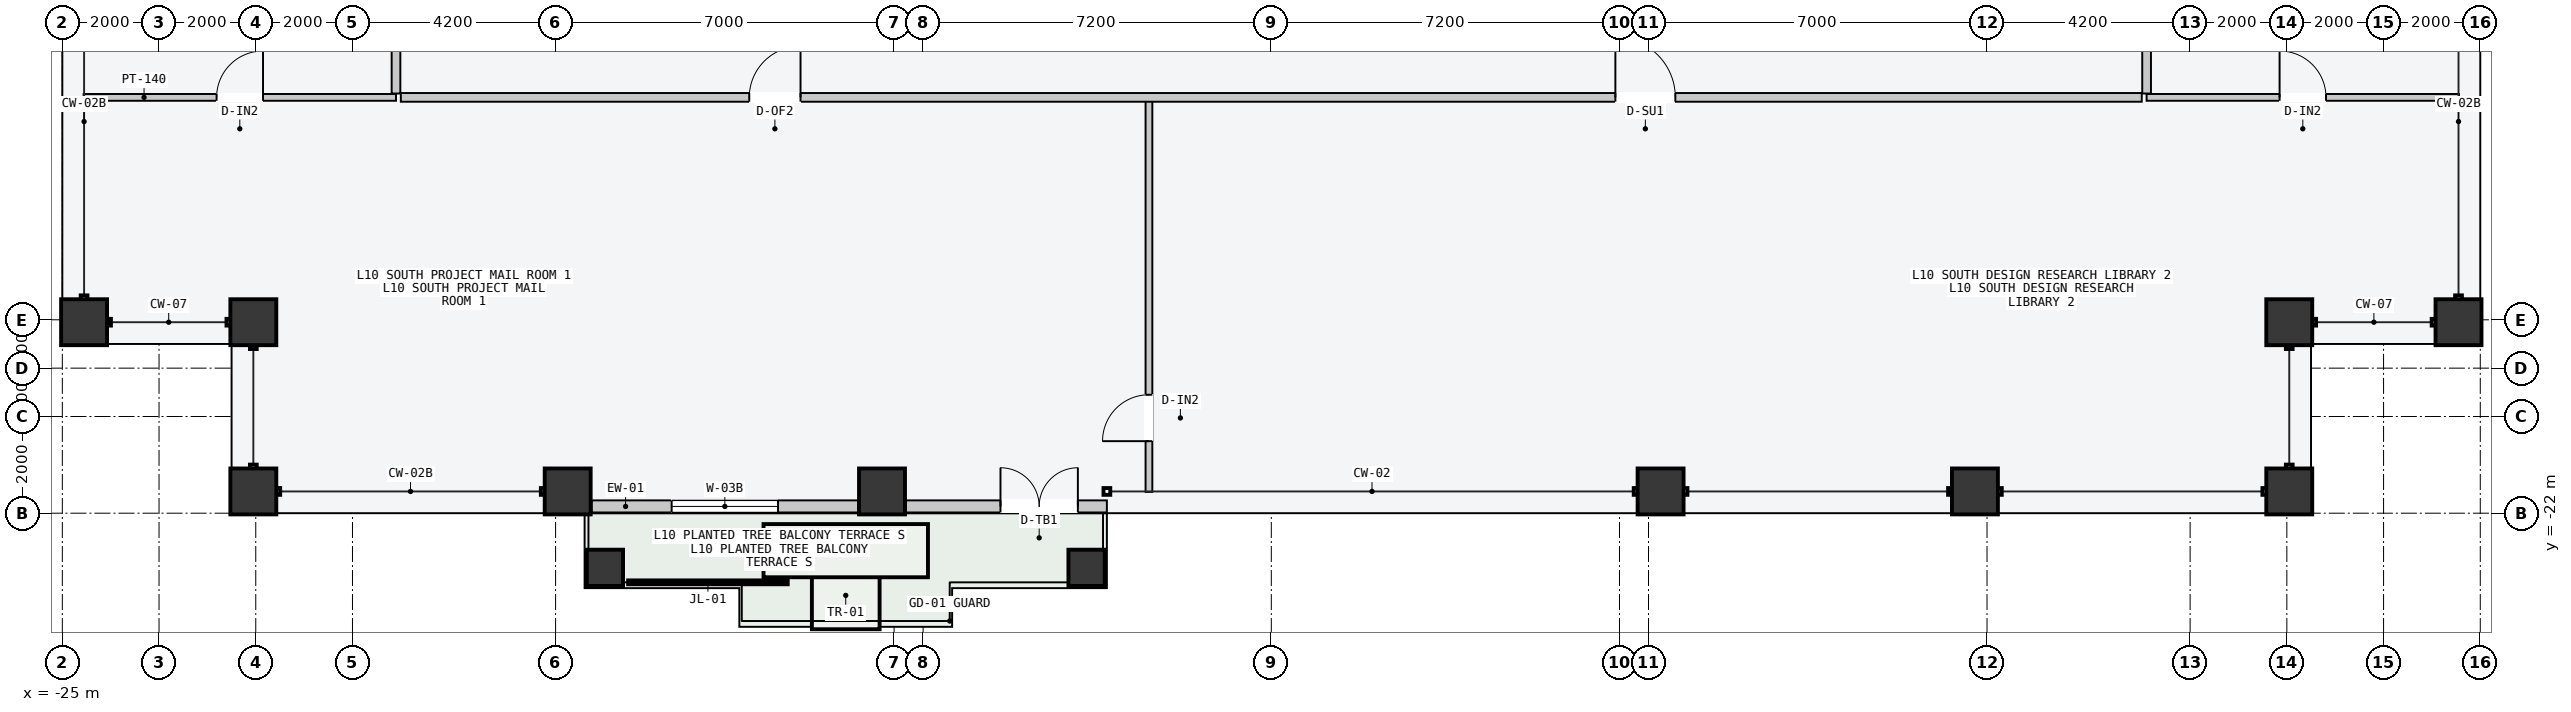
"""IFC4 building model, lengths in metres.
Left out: names, types, materials, properties, quantities, classifications, styles, units other than length and angle.
Written with IfcOpenShell. Run it as: python <this file> out.ifc"""

import sys

from ifc_helpers import new_model, si_unit, direction, frame, frame_2d, origin, origin_2d, place, context, subcontext, project, spatial, rectangle, hollow_rectangle, extrude, element, fill, save


model = new_model("IFC4")
c1 = context("Model", 3, precision=1e-05, world=origin(), true_north=direction((0.0, 1.0)))
c2 = subcontext(c1, "Body", "Model", "MODEL_VIEW")
j1 = project(units=[si_unit("LENGTHUNIT", "METRE"), si_unit("PLANEANGLEUNIT", "RADIAN")], contexts=[c1])
p1 = place(None, origin())
s1 = spatial("IfcSite", under=j1, at=p1, CompositionType="ELEMENT")
p2 = place(p1, origin())
s2 = spatial("IfcBuilding", under=s1, at=p2, CompositionType="ELEMENT")
p3 = place(p2, frame((0.0, 0.0, 42.0)))
s3 = spatial("IfcBuildingStorey", under=s2, at=p3, CompositionType="ELEMENT", Elevation=42.0)
for number, where, z_axis, x_axis in (
    (1, (-21.05, -21.55, 0.0), (0.0, 0.0, 1.0), (1.0, 0.0, 0.0)),
    (2, (-14.55, -21.55, 0.0), (0.0, 0.0, 1.0), (1.0, 0.0, 0.0)),
    (3, (-8.05, -21.55, 0.0), (0.0, 0.0, 1.0), (1.0, 0.0, 0.0)),
    (4, (8.05, -21.55, 0.0), (0.0, 0.0, 1.0), (1.0, 0.0, 0.0)),
    (5, (14.55, -21.55, 0.0), (0.0, 0.0, 1.0), (1.0, 0.0, 0.0)),
    (6, (21.05, -21.55, 0.0), (0.0, 0.0, 1.0), (1.0, 0.0, 0.0)),
    (7, (-24.55, -18.05, 0.0), (0.0, 0.0, 1.0), (0.0, 1.0, 0.0)),
    (8, (24.55, -18.05, 0.0), (0.0, 0.0, 1.0), (0.0, 1.0, 0.0)),
    (9, (21.05, -18.05, 0.0), (0.0, 0.0, 1.0), (1.0, 0.0, 0.0)),
    (10, (-21.05, -18.05, 0.0), (0.0, 0.0, 1.0), (1.0, 0.0, 0.0)),
):
    element("IfcColumn", number, at=place(p3, frame(where, z_axis=z_axis, x_axis=x_axis)), inside=s3, PredefinedType="COLUMN", context=c2, shape_type="SweptSolid", body=[
        extrude(hollow_rectangle(XDim=0.95, YDim=0.95, WallThickness=0.048, at=origin_2d()), origin(), (0.0, 0.0, 1.0), 3.6),
    ])
for number, where, z_axis, x_axis in (
    (11, (-13.78, -23.13, 0.0), (0.0, 0.0, 1.0), (1.0, 0.0, 0.0)),
    (12, (-3.82, -23.13, 0.0), (0.0, 0.0, 1.0), (1.0, 0.0, 0.0)),
):
    element("IfcColumn", number, at=place(p3, frame(where, z_axis=z_axis, x_axis=x_axis)), inside=s3, PredefinedType="COLUMN", context=c2, shape_type="SweptSolid", body=[
        extrude(hollow_rectangle(XDim=0.75, YDim=0.75, WallThickness=0.032, at=origin_2d()), origin(), (0.0, 0.0, 1.0), 3.6),
    ])
p4 = place(p3, frame((-14.055, -21.86, 0.0), z_axis=(0.0, 0.0, 1.0), x_axis=(1.0, 0.0, 0.0)))
e13 = element("IfcWall", 13, at=p4, inside=s3, PredefinedType="STANDARD", context=c2, shape_type="SweptSolid", body=[
    extrude(rectangle(XDim=5.51, YDim=0.25, at=frame_2d((2.755, 0.0))), origin(), (0.0, 0.0, 1.0), 3.4),
])
p5 = place(p4, frame((1.655, 0.0, 0.85)))
e14 = element("IfcOpeningElement", 14, at=p5, cuts=e13, PredefinedType="OPENING", context=c2, shape_type="SweptSolid", body=[
    extrude(rectangle(XDim=2.2, YDim=2.1, at=frame_2d((1.1, 1.05))), frame((0.0, 0.135, 0.0), z_axis=(0.0, -1.0, 0.0), x_axis=(1.0, 0.0, 0.0)), (0.0, 0.0, 1.0), 0.27),
])
p6 = place(p3, frame((-7.555, -21.86, 0.0), z_axis=(0.0, 0.0, 1.0), x_axis=(1.0, 0.0, 0.0)))
e15 = element("IfcWall", 15, at=p6, inside=s3, PredefinedType="STANDARD", context=c2, shape_type="SweptSolid", body=[
    extrude(rectangle(XDim=4.155, YDim=0.25, at=frame_2d((2.078, 0.0))), origin(), (0.0, 0.0, 1.0), 3.4),
])
p7 = place(p6, frame((1.955, 0.0, 0.0)))
e16 = element("IfcOpeningElement", 16, at=p7, cuts=e15, PredefinedType="OPENING", context=c2, shape_type="SweptSolid", body=[
    extrude(rectangle(XDim=1.6, YDim=2.2, at=frame_2d((0.8, 1.1))), frame((0.0, 0.135, 0.0), z_axis=(0.0, -1.0, 0.0), x_axis=(1.0, 0.0, 0.0)), (0.0, 0.0, 1.0), 0.27),
])
p8 = place(p3, frame((-2.53, -21.56, 0.0), z_axis=(0.0, 0.0, 1.0), x_axis=(0.0, 1.0, 0.0)))
e17 = element("IfcWall", 17, at=p8, inside=s3, PredefinedType="PARTITIONING", context=c2, shape_type="SweptSolid", body=[
    extrude(rectangle(XDim=8.1, YDim=0.14, at=frame_2d((4.05, 0.0))), origin(), (0.0, 0.0, 1.0), 3.4),
])
p9 = place(p8, frame((1.05, 0.0, 0.0)))
e18 = element("IfcOpeningElement", 18, at=p9, cuts=e17, PredefinedType="OPENING", context=c2, shape_type="SweptSolid", body=[
    extrude(rectangle(XDim=0.96, YDim=2.18, at=frame_2d((0.48, 1.09))), frame((0.0, 0.08, 0.0), z_axis=(0.0, -1.0, 0.0), x_axis=(1.0, 0.0, 0.0)), (0.0, 0.0, 1.0), 0.16),
])
p10 = place(p3, frame((-18.0, -13.4, 0.0), z_axis=(0.0, 0.0, 1.0), x_axis=(1.0, 0.0, 0.0)))
e19 = element("IfcWall", 19, at=p10, inside=s3, PredefinedType="PARTITIONING", context=c2, shape_type="SweptSolid", body=[
    extrude(rectangle(XDim=36.0, YDim=0.18, at=frame_2d((18.0, 0.0))), origin(), (0.0, 0.0, 1.0), 3.4),
])
p11 = place(p10, frame((7.205, 0.0, 0.0)))
e20 = element("IfcOpeningElement", 20, at=p11, cuts=e19, PredefinedType="OPENING", context=c2, shape_type="SweptSolid", body=[
    extrude(rectangle(XDim=1.06, YDim=2.2, at=frame_2d((0.53, 1.1))), frame((0.0, 0.1, 0.0), z_axis=(0.0, -1.0, 0.0), x_axis=(1.0, 0.0, 0.0)), (0.0, 0.0, 1.0), 0.2),
])
p12 = place(p10, frame((25.115, 0.0, 0.0)))
e21 = element("IfcOpeningElement", 21, at=p12, cuts=e19, PredefinedType="OPENING", context=c2, shape_type="SweptSolid", body=[
    extrude(rectangle(XDim=1.24, YDim=2.24, at=frame_2d((0.62, 1.12))), frame((0.0, 0.1, 0.0), z_axis=(0.0, -1.0, 0.0), x_axis=(1.0, 0.0, 0.0)), (0.0, 0.0, 1.0), 0.2),
])
p13 = place(p3, frame((-24.56, -13.4, 0.0), z_axis=(0.0, 0.0, 1.0), x_axis=(1.0, 0.0, 0.0)))
e22 = element("IfcWall", 22, at=p13, inside=s3, PredefinedType="PARTITIONING", context=c2, shape_type="SweptSolid", body=[
    extrude(rectangle(XDim=6.46, YDim=0.14, at=frame_2d((3.23, 0.0))), origin(), (0.0, 0.0, 1.0), 3.4),
])
p14 = place(p13, frame((2.75, 0.0, 0.0)))
e23 = element("IfcOpeningElement", 23, at=p14, cuts=e22, PredefinedType="OPENING", context=c2, shape_type="SweptSolid", body=[
    extrude(rectangle(XDim=0.96, YDim=2.18, at=frame_2d((0.48, 1.09))), frame((0.0, 0.08, 0.0), z_axis=(0.0, -1.0, 0.0), x_axis=(1.0, 0.0, 0.0)), (0.0, 0.0, 1.0), 0.16),
])
p15 = place(p3, frame((18.1, -13.4, 0.0), z_axis=(0.0, 0.0, 1.0), x_axis=(1.0, 0.0, 0.0)))
e24 = element("IfcWall", 24, at=p15, inside=s3, PredefinedType="PARTITIONING", context=c2, shape_type="SweptSolid", body=[
    extrude(rectangle(XDim=6.46, YDim=0.14, at=frame_2d((3.23, 0.0))), origin(), (0.0, 0.0, 1.0), 3.4),
])
p16 = place(p15, frame((2.75, 0.0, 0.0)))
e25 = element("IfcOpeningElement", 25, at=p16, cuts=e24, PredefinedType="OPENING", context=c2, shape_type="SweptSolid", body=[
    extrude(rectangle(XDim=0.96, YDim=2.18, at=frame_2d((0.48, 1.09))), frame((0.0, 0.08, 0.0), z_axis=(0.0, -1.0, 0.0), x_axis=(1.0, 0.0, 0.0)), (0.0, 0.0, 1.0), 0.16),
])
p17 = place(p3, frame((-18.1, -13.32, 0.0), z_axis=(0.0, 0.0, 1.0), x_axis=(0.0, 1.0, 0.0)))
e26 = element("IfcWall", 26, at=p17, inside=s3, PredefinedType="PARTITIONING", context=c2, shape_type="SweptSolid", body=[
    extrude(rectangle(XDim=26.64, YDim=0.18, at=frame_2d((13.32, 0.0))), origin(), (0.0, 0.0, 1.0), 3.4),
])
p18 = place(p17, frame((4.049, 0.0, 0.0)))
e27 = element("IfcOpeningElement", 27, at=p18, cuts=e26, PredefinedType="OPENING", context=c2, shape_type="SweptSolid", body=[
    extrude(rectangle(XDim=0.96, YDim=2.18, at=frame_2d((0.48, 1.09))), frame((0.0, 0.1, 0.0), z_axis=(0.0, -1.0, 0.0), x_axis=(1.0, 0.0, 0.0)), (0.0, 0.0, 1.0), 0.2),
])
p19 = place(p17, frame((17.339, 0.0, 0.0)))
e28 = element("IfcOpeningElement", 28, at=p19, cuts=e26, PredefinedType="OPENING", context=c2, shape_type="SweptSolid", body=[
    extrude(rectangle(XDim=1.02, YDim=2.2, at=frame_2d((0.51, 1.1))), frame((0.0, 0.1, 0.0), z_axis=(0.0, -1.0, 0.0), x_axis=(1.0, 0.0, 0.0)), (0.0, 0.0, 1.0), 0.2),
])
p20 = place(p3, frame((18.1, -13.32, 0.0), z_axis=(0.0, 0.0, 1.0), x_axis=(0.0, 1.0, 0.0)))
e29 = element("IfcWall", 29, at=p20, inside=s3, PredefinedType="PARTITIONING", context=c2, shape_type="SweptSolid", body=[
    extrude(rectangle(XDim=26.64, YDim=0.18, at=frame_2d((13.32, 0.0))), origin(), (0.0, 0.0, 1.0), 3.4),
])
p21 = place(p20, frame((12.84, 0.0, 0.0)))
e30 = element("IfcOpeningElement", 30, at=p21, cuts=e29, PredefinedType="OPENING", context=c2, shape_type="SweptSolid", body=[
    extrude(rectangle(XDim=0.96, YDim=2.18, at=frame_2d((0.48, 1.09))), frame((0.0, 0.1, 0.0), z_axis=(0.0, -1.0, 0.0), x_axis=(1.0, 0.0, 0.0)), (0.0, 0.0, 1.0), 0.2),
])
p22 = place(p5, origin())
e31 = element("IfcWindow", 31, at=p22, inside=s3, PartitioningType="SINGLE_PANEL", PredefinedType="WINDOW", context=c2, shape_type="SweptSolid", body=[
    extrude(rectangle(XDim=2.2, YDim=2.1, at=frame_2d((1.1, 1.05))), frame((0.0, 0.03, 0.0), z_axis=(0.0, -1.0, 0.0), x_axis=(1.0, 0.0, 0.0)), (0.0, 0.0, 1.0), 0.06),
])
fill(e14, e31)
p23 = place(p7, origin())
e32 = element("IfcDoor", 32, at=p23, inside=s3, OperationType="DOUBLE_DOOR_SINGLE_SWING", PredefinedType="DOOR", context=c2, shape_type="SweptSolid", body=[
    extrude(rectangle(XDim=1.6, YDim=2.2, at=frame_2d((0.8, 1.1))), frame((0.0, 0.025, 0.0), z_axis=(0.0, -1.0, 0.0), x_axis=(1.0, 0.0, 0.0)), (0.0, 0.0, 1.0), 0.05),
])
fill(e16, e32)
p24 = place(p9, origin())
e33 = element("IfcDoor", 33, at=p24, inside=s3, OperationType="SINGLE_SWING_LEFT", PredefinedType="DOOR", context=c2, shape_type="SweptSolid", body=[
    extrude(rectangle(XDim=0.96, YDim=2.18, at=frame_2d((0.48, 1.09))), frame((0.0, 0.025, 0.0), z_axis=(0.0, -1.0, 0.0), x_axis=(1.0, 0.0, 0.0)), (0.0, 0.0, 1.0), 0.05),
])
fill(e18, e33)
p25 = place(p11, origin())
e34 = element("IfcDoor", 34, at=p25, inside=s3, OperationType="SINGLE_SWING_RIGHT", PredefinedType="DOOR", context=c2, shape_type="SweptSolid", body=[
    extrude(rectangle(XDim=1.06, YDim=2.2, at=frame_2d((0.53, 1.1))), frame((0.0, 0.025, 0.0), z_axis=(0.0, -1.0, 0.0), x_axis=(1.0, 0.0, 0.0)), (0.0, 0.0, 1.0), 0.05),
])
fill(e20, e34)
p26 = place(p12, origin())
e35 = element("IfcDoor", 35, at=p26, inside=s3, OperationType="SINGLE_SWING_LEFT", PredefinedType="DOOR", context=c2, shape_type="SweptSolid", body=[
    extrude(rectangle(XDim=1.24, YDim=2.24, at=frame_2d((0.62, 1.12))), frame((0.0, 0.025, 0.0), z_axis=(0.0, -1.0, 0.0), x_axis=(1.0, 0.0, 0.0)), (0.0, 0.0, 1.0), 0.05),
])
fill(e21, e35)
p27 = place(p14, origin())
e36 = element("IfcDoor", 36, at=p27, inside=s3, OperationType="SINGLE_SWING_RIGHT", PredefinedType="DOOR", context=c2, shape_type="SweptSolid", body=[
    extrude(rectangle(XDim=0.96, YDim=2.18, at=frame_2d((0.48, 1.09))), frame((0.0, 0.025, 0.0), z_axis=(0.0, -1.0, 0.0), x_axis=(1.0, 0.0, 0.0)), (0.0, 0.0, 1.0), 0.05),
])
fill(e23, e36)
p28 = place(p16, origin())
e37 = element("IfcDoor", 37, at=p28, inside=s3, OperationType="SINGLE_SWING_LEFT", PredefinedType="DOOR", context=c2, shape_type="SweptSolid", body=[
    extrude(rectangle(XDim=0.96, YDim=2.18, at=frame_2d((0.48, 1.09))), frame((0.0, 0.025, 0.0), z_axis=(0.0, -1.0, 0.0), x_axis=(1.0, 0.0, 0.0)), (0.0, 0.0, 1.0), 0.05),
])
fill(e25, e37)
save(model, sys.argv[1])
